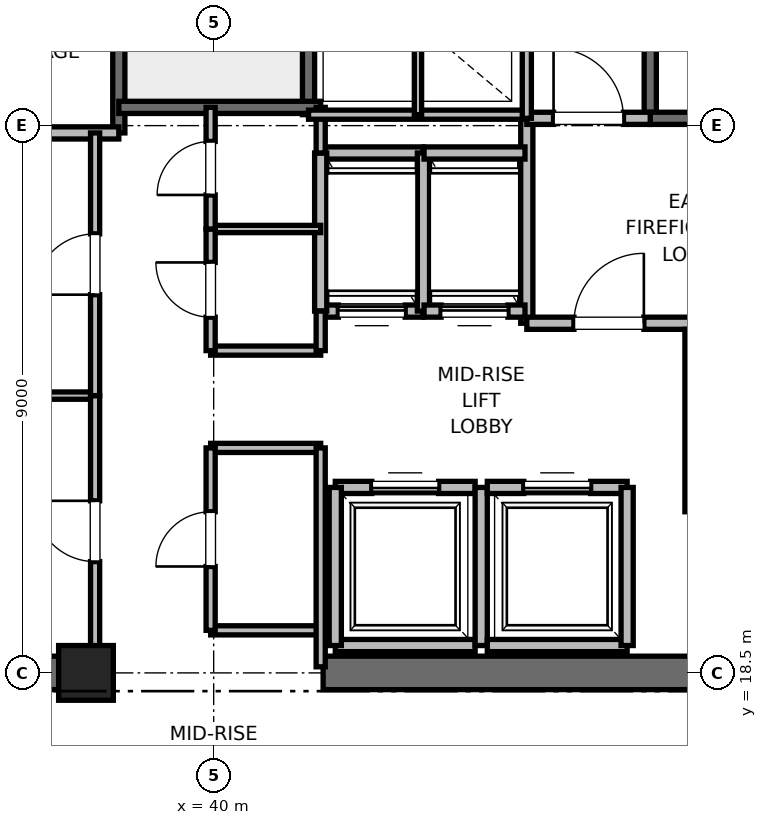
"""IFC4 building model, lengths in metres.
Left out: names, types, materials, properties, quantities, classifications, styles, units other than length and angle.
Written with IfcOpenShell. Run it as: python <this file> out.ifc"""

import sys

from ifc_helpers import new_model, si_unit, direction, frame, frame_2d, origin, origin_2d, place, context, subcontext, project, spatial, rectangle, extrude, element, fill, save


model = new_model("IFC4")
c1 = context("Model", 3, precision=1e-05, world=origin(), true_north=direction((0.0, 1.0)))
c2 = subcontext(c1, "Body", "Model", "MODEL_VIEW")
j1 = project(units=[si_unit("LENGTHUNIT", "METRE"), si_unit("PLANEANGLEUNIT", "RADIAN")], contexts=[c1])
p1 = place(None, origin())
s1 = spatial("IfcSite", under=j1, at=p1, CompositionType="ELEMENT")
p2 = place(p1, origin())
s2 = spatial("IfcBuilding", under=s1, at=p2, CompositionType="ELEMENT")
p3 = place(p2, frame((0.0, 0.0, 217.2)))
s3 = spatial("IfcBuildingStorey", under=s2, at=p3, CompositionType="ELEMENT", Elevation=217.2)
p4 = place(p3, frame((37.9, 18.5, 0.0), z_axis=(0.0, 0.0, 1.0), x_axis=(1.0, 0.0, 0.0)))
e1 = element("IfcColumn", 1, at=p4, inside=s3, PredefinedType="PILASTER", context=c2, shape_type="SweptSolid", body=[
    extrude(rectangle(XDim=0.9, YDim=0.9, at=origin_2d()), origin(), (0.0, 0.0, 1.0), 4.0),
])
for number, where, z_axis, x_axis in (
    (2, (29.0, 18.5, 0.0), (0.0, 0.0, 1.0), (1.0, 0.0, 0.0)),
    (3, (41.8, 18.5, 0.0), (0.0, 0.0, 1.0), (1.0, 0.0, 0.0)),
):
    element("IfcWall", number, at=place(p3, frame(where, z_axis=z_axis, x_axis=x_axis)), inside=s3, PredefinedType="SHEAR", context=c2, shape_type="SweptSolid", body=[
        extrude(rectangle(XDim=9.2, YDim=0.55, at=frame_2d((4.6, 0.0))), origin(), (0.0, 0.0, 1.0), 3.775),
    ])
p5 = place(p3, frame((47.18, 27.62, 0.0), z_axis=(0.0, 0.0, 1.0), x_axis=(0.0, 1.0, 0.0)))
e4 = element("IfcWall", 4, at=p5, inside=s3, PredefinedType="SOLIDWALL", context=c2, shape_type="SweptSolid", body=[
    extrude(rectangle(XDim=8.18, YDim=0.2, at=frame_2d((4.09, 0.0))), origin(), (0.0, 0.0, 1.0), 3.775),
])
p6 = place(p3, frame((47.18, 27.62, 0.0), z_axis=(0.0, 0.0, 1.0), x_axis=(1.0, 0.0, 0.0)))
e5 = element("IfcWall", 5, at=p6, inside=s3, PredefinedType="SOLIDWALL", context=c2, shape_type="SweptSolid", body=[
    extrude(rectangle(XDim=3.12, YDim=0.2, at=frame_2d((1.56, 0.0))), origin(), (0.0, 0.0, 1.0), 3.775),
])
p7 = place(p6, frame((1.01, 0.0, 0.0)))
e6 = element("IfcOpeningElement", 6, at=p7, cuts=e5, PredefinedType="OPENING", context=c2, shape_type="SweptSolid", body=[
    extrude(rectangle(XDim=1.1, YDim=2.15, at=frame_2d((0.55, 1.075))), frame((0.0, 0.1, 0.0), z_axis=(0.0, -1.0, 0.0), x_axis=(1.0, 0.0, 0.0)), (0.0, 0.0, 1.0), 0.2),
])
p8 = place(p3, frame((38.44, 27.38, 0.0), z_axis=(0.0, 0.0, 1.0), x_axis=(0.0, 1.0, 0.0)))
e7 = element("IfcWall", 7, at=p8, inside=s3, PredefinedType="SOLIDWALL", context=c2, shape_type="SweptSolid", body=[
    extrude(rectangle(XDim=8.87, YDim=0.2, at=frame_2d((4.435, 0.0))), origin(), (0.0, 0.0, 1.0), 3.775),
])
p9 = place(p3, frame((41.56, 27.68, 0.0), z_axis=(0.0, 0.0, 1.0), x_axis=(0.0, 1.0, 0.0)))
e8 = element("IfcWall", 8, at=p9, inside=s3, PredefinedType="SOLIDWALL", context=c2, shape_type="SweptSolid", body=[
    extrude(rectangle(XDim=8.57, YDim=0.2, at=frame_2d((4.285, 0.0))), origin(), (0.0, 0.0, 1.0), 3.775),
])
p10 = place(p3, frame((38.44, 27.8, 0.0), z_axis=(0.0, 0.0, 1.0), x_axis=(1.0, 0.0, 0.0)))
e9 = element("IfcWall", 9, at=p10, inside=s3, PredefinedType="SOLIDWALL", context=c2, shape_type="SweptSolid", body=[
    extrude(rectangle(XDim=3.32, YDim=0.2, at=frame_2d((1.66, 0.0))), origin(), (0.0, 0.0, 1.0), 3.775),
])
p11 = place(p3, frame((32.82, 27.38, 0.0), z_axis=(0.0, 0.0, 1.0), x_axis=(1.0, 0.0, 0.0)))
e10 = element("IfcWall", 10, at=p11, inside=s3, PredefinedType="PARTITIONING", context=c2, shape_type="SweptSolid", body=[
    extrude(rectangle(XDim=5.62, YDim=0.2, at=frame_2d((2.81, 0.0))), origin(), (0.0, 0.0, 1.0), 3.775),
])
p12 = place(p3, frame((45.15, 24.25, 0.0), z_axis=(0.0, 0.0, 1.0), x_axis=(0.0, 1.0, 0.0)))
e11 = element("IfcWall", 11, at=p12, inside=s3, PredefinedType="PARTITIONING", context=c2, shape_type="SweptSolid", body=[
    extrude(rectangle(XDim=3.37, YDim=0.2, at=frame_2d((1.685, 0.0))), origin(), (0.0, 0.0, 1.0), 3.775),
])
p13 = place(p3, frame((45.15, 24.25, 0.0), z_axis=(0.0, 0.0, 1.0), x_axis=(1.0, 0.0, 0.0)))
e12 = element("IfcWall", 12, at=p13, inside=s3, PredefinedType="PARTITIONING", context=c2, shape_type="SweptSolid", body=[
    extrude(rectangle(XDim=2.7, YDim=0.2, at=frame_2d((1.35, 0.0))), origin(), (0.0, 0.0, 1.0), 3.775),
])
p14 = place(p13, frame((0.775, 0.0, 0.0)))
e13 = element("IfcOpeningElement", 13, at=p14, cuts=e12, PredefinedType="OPENING", context=c2, shape_type="SweptSolid", body=[
    extrude(rectangle(XDim=1.15, YDim=2.2, at=frame_2d((0.575, 1.1))), frame((0.0, 0.1, 0.0), z_axis=(0.0, -1.0, 0.0), x_axis=(1.0, 0.0, 0.0)), (0.0, 0.0, 1.0), 0.2),
])
p15 = place(p3, frame((45.15, 27.62, 0.0), z_axis=(0.0, 0.0, 1.0), x_axis=(1.0, 0.0, 0.0)))
e14 = element("IfcWall", 14, at=p15, inside=s3, PredefinedType="PARTITIONING", context=c2, shape_type="SweptSolid", body=[
    extrude(rectangle(XDim=2.03, YDim=0.2, at=frame_2d((1.015, 0.0))), origin(), (0.0, 0.0, 1.0), 3.775),
])
p16 = place(p15, frame((0.44, 0.0, 0.0)))
e15 = element("IfcOpeningElement", 15, at=p16, cuts=e14, PredefinedType="OPENING", context=c2, shape_type="SweptSolid", body=[
    extrude(rectangle(XDim=1.15, YDim=2.2, at=frame_2d((0.575, 1.1))), frame((0.0, 0.1, 0.0), z_axis=(0.0, -1.0, 0.0), x_axis=(1.0, 0.0, 0.0)), (0.0, 0.0, 1.0), 0.2),
])
p17 = place(p3, frame((47.85, 24.15, 0.0), z_axis=(0.0, 0.0, 1.0), x_axis=(0.0, -1.0, 0.0)))
e16 = element("IfcWall", 16, at=p17, inside=s3, PredefinedType="SOLIDWALL", context=c2, shape_type="SweptSolid", body=[
    extrude(rectangle(XDim=3.0, YDim=0.2, at=frame_2d((1.5, 0.0))), origin(), (0.0, 0.0, 1.0), 3.775),
])
p18 = place(p3, frame((42.0, 18.95, 0.0), z_axis=(0.0, 0.0, 1.0), x_axis=(1.0, 0.0, 0.0)))
e17 = element("IfcWall", 17, at=p18, inside=s3, PredefinedType="SOLIDWALL", context=c2, shape_type="SweptSolid", body=[
    extrude(rectangle(XDim=2.3, YDim=0.2, at=frame_2d((1.15, 0.0))), origin(), (0.0, 0.0, 1.0), 2.755),
])
p19 = place(p3, frame((44.3, 21.55, 0.0), z_axis=(0.0, 0.0, 1.0), x_axis=(-1.0, 0.0, 0.0)))
e18 = element("IfcWall", 18, at=p19, inside=s3, PredefinedType="SOLIDWALL", context=c2, shape_type="SweptSolid", body=[
    extrude(rectangle(XDim=2.3, YDim=0.2, at=frame_2d((1.15, 0.0))), origin(), (0.0, 0.0, 1.0), 3.775),
])
p20 = place(p19, frame((0.6, 0.0, 0.0)))
e19 = element("IfcOpeningElement", 19, at=p20, cuts=e18, PredefinedType="OPENING", context=c2, shape_type="SweptSolid", body=[
    extrude(rectangle(XDim=1.1, YDim=2.2, at=frame_2d((0.55, 1.1))), frame((0.0, 0.1, 0.0), z_axis=(0.0, -1.0, 0.0), x_axis=(1.0, 0.0, 0.0)), (0.0, 0.0, 1.0), 0.2),
])
p21 = place(p3, frame((42.0, 21.55, 0.0), z_axis=(0.0, 0.0, 1.0), x_axis=(0.0, -1.0, 0.0)))
e20 = element("IfcWall", 20, at=p21, inside=s3, PredefinedType="SOLIDWALL", context=c2, shape_type="SweptSolid", body=[
    extrude(rectangle(XDim=2.6, YDim=0.2, at=frame_2d((1.3, 0.0))), origin(), (0.0, 0.0, 1.0), 2.755),
])
p22 = place(p3, frame((44.4, 18.95, 0.0), z_axis=(0.0, 0.0, 1.0), x_axis=(0.0, 1.0, 0.0)))
e21 = element("IfcWall", 21, at=p22, inside=s3, PredefinedType="SOLIDWALL", context=c2, shape_type="SweptSolid", body=[
    extrude(rectangle(XDim=2.6, YDim=0.2, at=frame_2d((1.3, 0.0))), origin(), (0.0, 0.0, 1.0), 3.775),
])
p23 = place(p3, frame((44.5, 18.95, 0.0), z_axis=(0.0, 0.0, 1.0), x_axis=(1.0, 0.0, 0.0)))
e22 = element("IfcWall", 22, at=p23, inside=s3, PredefinedType="SOLIDWALL", context=c2, shape_type="SweptSolid", body=[
    extrude(rectangle(XDim=2.3, YDim=0.2, at=frame_2d((1.15, 0.0))), origin(), (0.0, 0.0, 1.0), 3.775),
])
p24 = place(p3, frame((46.8, 21.55, 0.0), z_axis=(0.0, 0.0, 1.0), x_axis=(-1.0, 0.0, 0.0)))
e23 = element("IfcWall", 23, at=p24, inside=s3, PredefinedType="SOLIDWALL", context=c2, shape_type="SweptSolid", body=[
    extrude(rectangle(XDim=2.3, YDim=0.2, at=frame_2d((1.15, 0.0))), origin(), (0.0, 0.0, 1.0), 3.775),
])
p25 = place(p24, frame((0.6, 0.0, 0.0)))
e24 = element("IfcOpeningElement", 24, at=p25, cuts=e23, PredefinedType="OPENING", context=c2, shape_type="SweptSolid", body=[
    extrude(rectangle(XDim=1.1, YDim=2.2, at=frame_2d((0.55, 1.1))), frame((0.0, 0.1, 0.0), z_axis=(0.0, -1.0, 0.0), x_axis=(1.0, 0.0, 0.0)), (0.0, 0.0, 1.0), 0.2),
])
p26 = place(p3, frame((46.8, 18.95, 0.0), z_axis=(0.0, 0.0, 1.0), x_axis=(0.0, 1.0, 0.0)))
e25 = element("IfcWall", 25, at=p26, inside=s3, PredefinedType="SOLIDWALL", context=c2, shape_type="SweptSolid", body=[
    extrude(rectangle(XDim=2.6, YDim=0.2, at=frame_2d((1.3, 0.0))), origin(), (0.0, 0.0, 1.0), 3.775),
])
p27 = place(p3, frame((41.76, 24.45, 0.0), z_axis=(0.0, 0.0, 1.0), x_axis=(1.0, 0.0, 0.0)))
e26 = element("IfcWall", 26, at=p27, inside=s3, PredefinedType="SOLIDWALL", context=c2, shape_type="SweptSolid", body=[
    extrude(rectangle(XDim=1.68, YDim=0.2, at=frame_2d((0.84, 0.0))), origin(), (0.0, 0.0, 1.0), 3.775),
])
p28 = place(p27, frame((0.29, 0.0, 0.0)))
e27 = element("IfcOpeningElement", 27, at=p28, cuts=e26, PredefinedType="OPENING", context=c2, shape_type="SweptSolid", body=[
    extrude(rectangle(XDim=1.1, YDim=2.2, at=frame_2d((0.55, 1.1))), frame((0.0, 0.1, 0.0), z_axis=(0.0, -1.0, 0.0), x_axis=(1.0, 0.0, 0.0)), (0.0, 0.0, 1.0), 0.2),
])
p29 = place(p3, frame((43.44, 27.05, 0.0), z_axis=(0.0, 0.0, 1.0), x_axis=(-1.0, 0.0, 0.0)))
e28 = element("IfcWall", 28, at=p29, inside=s3, PredefinedType="SOLIDWALL", context=c2, shape_type="SweptSolid", body=[
    extrude(rectangle(XDim=1.68, YDim=0.2, at=frame_2d((0.84, 0.0))), origin(), (0.0, 0.0, 1.0), 3.775),
])
for number, where, z_axis, x_axis in (
    (29, (41.76, 27.05, 0.0), (0.0, 0.0, 1.0), (0.0, -1.0, 0.0)),
    (30, (43.45, 24.45, 0.0), (0.0, 0.0, 1.0), (0.0, 1.0, 0.0)),
):
    element("IfcWall", number, at=place(p3, frame(where, z_axis=z_axis, x_axis=x_axis)), inside=s3, PredefinedType="SOLIDWALL", context=c2, shape_type="SweptSolid", body=[
        extrude(rectangle(XDim=2.6, YDim=0.2, at=frame_2d((1.3, 0.0))), origin(), (0.0, 0.0, 1.0), 3.775),
    ])
p30 = place(p3, frame((43.46, 24.45, 0.0), z_axis=(0.0, 0.0, 1.0), x_axis=(1.0, 0.0, 0.0)))
e31 = element("IfcWall", 31, at=p30, inside=s3, PredefinedType="SOLIDWALL", context=c2, shape_type="SweptSolid", body=[
    extrude(rectangle(XDim=1.66, YDim=0.2, at=frame_2d((0.83, 0.0))), origin(), (0.0, 0.0, 1.0), 3.775),
])
p31 = place(p30, frame((0.28, 0.0, 0.0)))
e32 = element("IfcOpeningElement", 32, at=p31, cuts=e31, PredefinedType="OPENING", context=c2, shape_type="SweptSolid", body=[
    extrude(rectangle(XDim=1.1, YDim=2.2, at=frame_2d((0.55, 1.1))), frame((0.0, 0.1, 0.0), z_axis=(0.0, -1.0, 0.0), x_axis=(1.0, 0.0, 0.0)), (0.0, 0.0, 1.0), 0.2),
])
p32 = place(p3, frame((45.12, 27.05, 0.0), z_axis=(0.0, 0.0, 1.0), x_axis=(-1.0, 0.0, 0.0)))
e33 = element("IfcWall", 33, at=p32, inside=s3, PredefinedType="SOLIDWALL", context=c2, shape_type="SweptSolid", body=[
    extrude(rectangle(XDim=1.66, YDim=0.2, at=frame_2d((0.83, 0.0))), origin(), (0.0, 0.0, 1.0), 3.775),
])
for number, where, z_axis, x_axis in (
    (34, (39.95, 19.2, 0.0), (0.0, 0.0, 1.0), (1.0, 0.0, 0.0)),
    (35, (39.95, 22.2, 0.0), (0.0, 0.0, 1.0), (1.0, 0.0, 0.0)),
    (36, (39.95, 23.8, 0.0), (0.0, 0.0, 1.0), (1.0, 0.0, 0.0)),
):
    element("IfcWall", number, at=place(p3, frame(where, z_axis=z_axis, x_axis=x_axis)), inside=s3, PredefinedType="PARTITIONING", context=c2, shape_type="SweptSolid", body=[
        extrude(rectangle(XDim=1.81, YDim=0.15, at=frame_2d((0.905, 0.0))), origin(), (0.0, 0.0, 1.0), 2.85),
    ])
p33 = place(p3, frame((39.95, 25.8, 0.0), z_axis=(0.0, 0.0, 1.0), x_axis=(1.0, 0.0, 0.0)))
e37 = element("IfcWall", 37, at=p33, inside=s3, PredefinedType="PARTITIONING", context=c2, shape_type="SweptSolid", body=[
    extrude(rectangle(XDim=1.81, YDim=0.12, at=frame_2d((0.905, 0.0))), origin(), (0.0, 0.0, 1.0), 2.85),
])
p34 = place(p3, frame((41.76, 18.6, 0.0), z_axis=(0.0, 0.0, 1.0), x_axis=(0.0, 1.0, 0.0)))
e38 = element("IfcWall", 38, at=p34, inside=s3, PredefinedType="PARTITIONING", context=c2, shape_type="SweptSolid", body=[
    extrude(rectangle(XDim=3.6, YDim=0.15, at=frame_2d((1.8, 0.0))), origin(), (0.0, 0.0, 1.0), 2.755),
])
p35 = place(p3, frame((41.76, 23.8, 0.0), z_axis=(0.0, 0.0, 1.0), x_axis=(0.0, 1.0, 0.0)))
e39 = element("IfcWall", 39, at=p35, inside=s3, PredefinedType="PARTITIONING", context=c2, shape_type="SweptSolid", body=[
    extrude(rectangle(XDim=0.65, YDim=0.15, at=frame_2d((0.325, 0.0))), origin(), (0.0, 0.0, 1.0), 2.85),
])
p36 = place(p3, frame((41.76, 27.05, 0.0), z_axis=(0.0, 0.0, 1.0), x_axis=(0.0, 1.0, 0.0)))
e40 = element("IfcWall", 40, at=p36, inside=s3, PredefinedType="PARTITIONING", context=c2, shape_type="SweptSolid", body=[
    extrude(rectangle(XDim=0.75, YDim=0.15, at=frame_2d((0.375, 0.0))), origin(), (0.0, 0.0, 1.0), 2.85),
])
p37 = place(p3, frame((39.95, 19.2, 0.0), z_axis=(0.0, 0.0, 1.0), x_axis=(0.0, 1.0, 0.0)))
e41 = element("IfcWall", 41, at=p37, inside=s3, PredefinedType="PARTITIONING", context=c2, shape_type="SweptSolid", body=[
    extrude(rectangle(XDim=3.0, YDim=0.15, at=frame_2d((1.5, 0.0))), origin(), (0.0, 0.0, 1.0), 2.85),
])
p38 = place(p37, frame((1.05, 0.0, 0.0)))
e42 = element("IfcOpeningElement", 42, at=p38, cuts=e41, PredefinedType="OPENING", context=c2, shape_type="SweptSolid", body=[
    extrude(rectangle(XDim=0.9, YDim=2.1, at=frame_2d((0.45, 1.05))), frame((0.0, 0.075, 0.0), z_axis=(0.0, -1.0, 0.0), x_axis=(1.0, 0.0, 0.0)), (0.0, 0.0, 1.0), 0.15),
])
p39 = place(p3, frame((39.95, 23.8, 0.0), z_axis=(0.0, 0.0, 1.0), x_axis=(0.0, 1.0, 0.0)))
e43 = element("IfcWall", 43, at=p39, inside=s3, PredefinedType="PARTITIONING", context=c2, shape_type="SweptSolid", body=[
    extrude(rectangle(XDim=2.0, YDim=0.15, at=frame_2d((1.0, 0.0))), origin(), (0.0, 0.0, 1.0), 2.85),
])
p40 = place(p39, frame((0.55, 0.0, 0.0)))
e44 = element("IfcOpeningElement", 44, at=p40, cuts=e43, PredefinedType="OPENING", context=c2, shape_type="SweptSolid", body=[
    extrude(rectangle(XDim=0.9, YDim=2.1, at=frame_2d((0.45, 1.05))), frame((0.0, 0.075, 0.0), z_axis=(0.0, -1.0, 0.0), x_axis=(1.0, 0.0, 0.0)), (0.0, 0.0, 1.0), 0.15),
])
p41 = place(p3, frame((39.95, 25.8, 0.0), z_axis=(0.0, 0.0, 1.0), x_axis=(0.0, 1.0, 0.0)))
e45 = element("IfcWall", 45, at=p41, inside=s3, PredefinedType="PARTITIONING", context=c2, shape_type="SweptSolid", body=[
    extrude(rectangle(XDim=2.0, YDim=0.15, at=frame_2d((1.0, 0.0))), origin(), (0.0, 0.0, 1.0), 2.85),
])
p42 = place(p41, frame((0.56, 0.0, 0.0)))
e46 = element("IfcOpeningElement", 46, at=p42, cuts=e45, PredefinedType="OPENING", context=c2, shape_type="SweptSolid", body=[
    extrude(rectangle(XDim=0.88, YDim=2.1, at=frame_2d((0.44, 1.05))), frame((0.0, 0.075, 0.0), z_axis=(0.0, -1.0, 0.0), x_axis=(1.0, 0.0, 0.0)), (0.0, 0.0, 1.0), 0.15),
])
p43 = place(p3, frame((32.82, 23.06, 0.0), z_axis=(0.0, 0.0, 1.0), x_axis=(1.0, 0.0, 0.0)))
e47 = element("IfcWall", 47, at=p43, inside=s3, PredefinedType="PARTITIONING", context=c2, shape_type="SweptSolid", body=[
    extrude(rectangle(XDim=5.23, YDim=0.12, at=frame_2d((2.615, 0.0))), origin(), (0.0, 0.0, 1.0), 2.85),
])
p44 = place(p3, frame((38.05, 18.6, 0.0), z_axis=(0.0, 0.0, 1.0), x_axis=(0.0, 1.0, 0.0)))
e48 = element("IfcWall", 48, at=p44, inside=s3, PredefinedType="PARTITIONING", context=c2, shape_type="SweptSolid", body=[
    extrude(rectangle(XDim=4.46, YDim=0.15, at=frame_2d((2.23, 0.0))), origin(), (0.0, 0.0, 1.0), 2.755),
])
p45 = place(p44, frame((1.73, 0.0, 0.0)))
e49 = element("IfcOpeningElement", 49, at=p45, cuts=e48, PredefinedType="OPENING", context=c2, shape_type="SweptSolid", body=[
    extrude(rectangle(XDim=1.0, YDim=2.15, at=frame_2d((0.5, 1.075))), frame((0.0, 0.075, 0.0), z_axis=(0.0, -1.0, 0.0), x_axis=(1.0, 0.0, 0.0)), (0.0, 0.0, 1.0), 0.15),
])
p46 = place(p3, frame((38.05, 23.06, 0.0), z_axis=(0.0, 0.0, 1.0), x_axis=(0.0, 1.0, 0.0)))
e50 = element("IfcWall", 50, at=p46, inside=s3, PredefinedType="PARTITIONING", context=c2, shape_type="SweptSolid", body=[
    extrude(rectangle(XDim=4.32, YDim=0.15, at=frame_2d((2.16, 0.0))), origin(), (0.0, 0.0, 1.0), 2.85),
])
p47 = place(p46, frame((1.66, 0.0, 0.0)))
e51 = element("IfcOpeningElement", 51, at=p47, cuts=e50, PredefinedType="OPENING", context=c2, shape_type="SweptSolid", body=[
    extrude(rectangle(XDim=1.0, YDim=2.15, at=frame_2d((0.5, 1.075))), frame((0.0, 0.075, 0.0), z_axis=(0.0, -1.0, 0.0), x_axis=(1.0, 0.0, 0.0)), (0.0, 0.0, 1.0), 0.15),
])
p48 = place(p3, frame((41.56, 27.68, 0.0), z_axis=(0.0, 0.0, 1.0), x_axis=(1.0, 0.0, 0.0)))
e52 = element("IfcWall", 52, at=p48, inside=s3, PredefinedType="PARTITIONING", context=c2, shape_type="SweptSolid", body=[
    extrude(rectangle(XDim=3.59, YDim=0.15, at=frame_2d((1.795, 0.0))), origin(), (0.0, 0.0, 1.0), 2.85),
])
p49 = place(p3, frame((45.15, 27.62, 0.0), z_axis=(0.0, 0.0, 1.0), x_axis=(0.0, 1.0, 0.0)))
e53 = element("IfcWall", 53, at=p49, inside=s3, PredefinedType="PARTITIONING", context=c2, shape_type="SweptSolid", body=[
    extrude(rectangle(XDim=3.1, YDim=0.15, at=frame_2d((1.55, 0.0))), origin(), (0.0, 0.0, 1.0), 2.85),
])
p50 = place(p3, frame((43.36, 27.68, 0.0), z_axis=(0.0, 0.0, 1.0), x_axis=(0.0, 1.0, 0.0)))
e54 = element("IfcWall", 54, at=p50, inside=s3, PredefinedType="PARTITIONING", context=c2, shape_type="SweptSolid", body=[
    extrude(rectangle(XDim=3.04, YDim=0.12, at=frame_2d((1.52, 0.0))), origin(), (0.0, 0.0, 1.0), 2.85),
])
p51 = place(p14, origin())
e55 = element("IfcDoor", 55, at=p51, inside=s3, OperationType="SINGLE_SWING_RIGHT", PredefinedType="DOOR", context=c2, shape_type="SweptSolid", body=[
    extrude(rectangle(XDim=1.15, YDim=2.2, at=frame_2d((0.575, 1.1))), frame((0.0, 0.025, 0.0), z_axis=(0.0, -1.0, 0.0), x_axis=(1.0, 0.0, 0.0)), (0.0, 0.0, 1.0), 0.05),
])
fill(e13, e55)
p52 = place(p16, origin())
e56 = element("IfcDoor", 56, at=p52, inside=s3, OperationType="SINGLE_SWING_LEFT", PredefinedType="DOOR", context=c2, shape_type="SweptSolid", body=[
    extrude(rectangle(XDim=1.15, YDim=2.2, at=frame_2d((0.575, 1.1))), frame((0.0, 0.025, 0.0), z_axis=(0.0, -1.0, 0.0), x_axis=(1.0, 0.0, 0.0)), (0.0, 0.0, 1.0), 0.05),
])
fill(e15, e56)
p53 = place(p20, origin())
e57 = element("IfcDoor", 57, at=p53, inside=s3, OperationType="SLIDING_TO_RIGHT", PredefinedType="DOOR", context=c2, shape_type="SweptSolid", body=[
    extrude(rectangle(XDim=1.1, YDim=2.2, at=frame_2d((0.55, 1.1))), frame((0.0, 0.025, 0.0), z_axis=(0.0, -1.0, 0.0), x_axis=(1.0, 0.0, 0.0)), (0.0, 0.0, 1.0), 0.05),
])
fill(e19, e57)
p54 = place(p25, origin())
e58 = element("IfcDoor", 58, at=p54, inside=s3, OperationType="SLIDING_TO_RIGHT", PredefinedType="DOOR", context=c2, shape_type="SweptSolid", body=[
    extrude(rectangle(XDim=1.1, YDim=2.2, at=frame_2d((0.55, 1.1))), frame((0.0, 0.025, 0.0), z_axis=(0.0, -1.0, 0.0), x_axis=(1.0, 0.0, 0.0)), (0.0, 0.0, 1.0), 0.05),
])
fill(e24, e58)
p55 = place(p28, origin())
e59 = element("IfcDoor", 59, at=p55, inside=s3, OperationType="SLIDING_TO_RIGHT", PredefinedType="DOOR", context=c2, shape_type="SweptSolid", body=[
    extrude(rectangle(XDim=1.1, YDim=2.2, at=frame_2d((0.55, 1.1))), frame((0.0, 0.025, 0.0), z_axis=(0.0, -1.0, 0.0), x_axis=(1.0, 0.0, 0.0)), (0.0, 0.0, 1.0), 0.05),
])
fill(e27, e59)
p56 = place(p31, origin())
e60 = element("IfcDoor", 60, at=p56, inside=s3, OperationType="SLIDING_TO_RIGHT", PredefinedType="DOOR", context=c2, shape_type="SweptSolid", body=[
    extrude(rectangle(XDim=1.1, YDim=2.2, at=frame_2d((0.55, 1.1))), frame((0.0, 0.025, 0.0), z_axis=(0.0, -1.0, 0.0), x_axis=(1.0, 0.0, 0.0)), (0.0, 0.0, 1.0), 0.05),
])
fill(e32, e60)
p57 = place(p38, origin())
e61 = element("IfcDoor", 61, at=p57, inside=s3, OperationType="SINGLE_SWING_LEFT", PredefinedType="DOOR", context=c2, shape_type="SweptSolid", body=[
    extrude(rectangle(XDim=0.9, YDim=2.1, at=frame_2d((0.45, 1.05))), frame((0.0, 0.025, 0.0), z_axis=(0.0, -1.0, 0.0), x_axis=(1.0, 0.0, 0.0)), (0.0, 0.0, 1.0), 0.05),
])
fill(e42, e61)
p58 = place(p40, origin())
e62 = element("IfcDoor", 62, at=p58, inside=s3, OperationType="SINGLE_SWING_RIGHT", PredefinedType="DOOR", context=c2, shape_type="SweptSolid", body=[
    extrude(rectangle(XDim=0.9, YDim=2.1, at=frame_2d((0.45, 1.05))), frame((0.0, 0.025, 0.0), z_axis=(0.0, -1.0, 0.0), x_axis=(1.0, 0.0, 0.0)), (0.0, 0.0, 1.0), 0.05),
])
fill(e44, e62)
p59 = place(p42, origin())
e63 = element("IfcDoor", 63, at=p59, inside=s3, OperationType="SINGLE_SWING_LEFT", PredefinedType="DOOR", context=c2, shape_type="SweptSolid", body=[
    extrude(rectangle(XDim=0.88, YDim=2.1, at=frame_2d((0.44, 1.05))), frame((0.0, 0.025, 0.0), z_axis=(0.0, -1.0, 0.0), x_axis=(1.0, 0.0, 0.0)), (0.0, 0.0, 1.0), 0.05),
])
fill(e46, e63)
p60 = place(p45, origin())
e64 = element("IfcDoor", 64, at=p60, inside=s3, OperationType="SINGLE_SWING_RIGHT", PredefinedType="DOOR", context=c2, shape_type="SweptSolid", body=[
    extrude(rectangle(XDim=1.0, YDim=2.15, at=frame_2d((0.5, 1.075))), frame((0.0, 0.025, 0.0), z_axis=(0.0, -1.0, 0.0), x_axis=(1.0, 0.0, 0.0)), (0.0, 0.0, 1.0), 0.05),
])
fill(e49, e64)
p61 = place(p47, origin())
e65 = element("IfcDoor", 65, at=p61, inside=s3, OperationType="SINGLE_SWING_LEFT", PredefinedType="DOOR", context=c2, shape_type="SweptSolid", body=[
    extrude(rectangle(XDim=1.0, YDim=2.15, at=frame_2d((0.5, 1.075))), frame((0.0, 0.025, 0.0), z_axis=(0.0, -1.0, 0.0), x_axis=(1.0, 0.0, 0.0)), (0.0, 0.0, 1.0), 0.05),
])
fill(e51, e65)
save(model, sys.argv[1])
